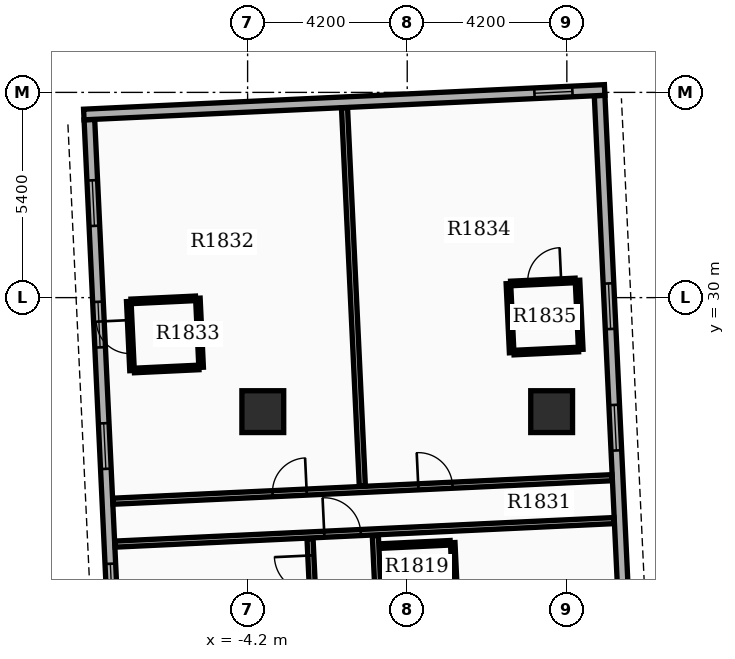
"""IFC4 building model, lengths in metres.
Left out: names, types, materials, properties, quantities, classifications, styles, units other than length and angle.
Written with IfcOpenShell. Run it as: python <this file> out.ifc"""

import sys

from ifc_helpers import new_model, si_unit, direction, frame, frame_2d, origin, origin_2d, place, context, subcontext, project, spatial, rectangle, extrude, element, fill, save


model = new_model("IFC4")
c1 = context("Model", 3, precision=1e-05, world=origin(), true_north=direction((0.0, 1.0)))
c2 = subcontext(c1, "Body", "Model", "MODEL_VIEW")
j1 = project(units=[si_unit("LENGTHUNIT", "METRE"), si_unit("PLANEANGLEUNIT", "RADIAN")], contexts=[c1])
p1 = place(None, origin())
s1 = spatial("IfcSite", under=j1, at=p1, CompositionType="ELEMENT")
p2 = place(p1, origin())
s2 = spatial("IfcBuilding", under=s1, at=p2, CompositionType="ELEMENT")
p3 = place(p2, frame((0.0, 0.0, 116.4)))
s3 = spatial("IfcBuildingStorey", under=s2, at=p3, CompositionType="ELEMENT", Elevation=116.4)
for number, where, z_axis, x_axis in (
    (1, (-3.8, 27.0, 0.0), (0.0, 0.0, 1.0), (1.0, 0.0, 0.0)),
    (2, (3.8, 27.0, 0.0), (0.0, 0.0, 1.0), (1.0, 0.0, 0.0)),
):
    element("IfcColumn", number, at=place(p3, frame(where, z_axis=z_axis, x_axis=x_axis)), inside=s3, PredefinedType="COLUMN", context=c2, shape_type="SweptSolid", body=[
        extrude(rectangle(XDim=1.1, YDim=1.1, at=origin_2d()), origin(), (0.0, 0.0, 1.0), 3.9),
    ])
p4 = place(p3, frame((6.009, 15.24, 0.0), z_axis=(0.0, 0.0, 1.0), x_axis=(-0.047103473814, 0.998890015344, 0.0)))
e3 = element("IfcWall", 3, at=p4, inside=s3, PredefinedType="STANDARD", context=c2, shape_type="SweptSolid", body=[
    extrude(rectangle(XDim=20.1, YDim=0.28, at=frame_2d((10.05, 0.0))), origin(), (0.0, 0.0, 1.0), 2.97),
])
p5 = place(p4, frame((1.6, 0.0, 0.8)))
e4 = element("IfcOpeningElement", 4, at=p5, cuts=e3, PredefinedType="OPENING", context=c2, shape_type="SweptSolid", body=[
    extrude(rectangle(XDim=1.2, YDim=1.6, at=frame_2d((0.6, 0.8))), frame((0.0, 0.15, 0.0), z_axis=(0.0, -1.0, 0.0), x_axis=(1.0, 0.0, 0.0)), (0.0, 0.0, 1.0), 0.3),
])
p6 = place(p4, frame((4.8, 0.0, 0.8)))
e5 = element("IfcOpeningElement", 5, at=p6, cuts=e3, PredefinedType="OPENING", context=c2, shape_type="SweptSolid", body=[
    extrude(rectangle(XDim=1.2, YDim=1.6, at=frame_2d((0.6, 0.8))), frame((0.0, 0.15, 0.0), z_axis=(0.0, -1.0, 0.0), x_axis=(1.0, 0.0, 0.0)), (0.0, 0.0, 1.0), 0.3),
])
p7 = place(p4, frame((10.75, 0.0, 0.8)))
e6 = element("IfcOpeningElement", 6, at=p7, cuts=e3, PredefinedType="OPENING", context=c2, shape_type="SweptSolid", body=[
    extrude(rectangle(XDim=1.2, YDim=1.6, at=frame_2d((0.6, 0.8))), frame((0.0, 0.15, 0.0), z_axis=(0.0, -1.0, 0.0), x_axis=(1.0, 0.0, 0.0)), (0.0, 0.0, 1.0), 0.3),
])
p8 = place(p4, frame((13.95, 0.0, 0.8)))
e7 = element("IfcOpeningElement", 7, at=p8, cuts=e3, PredefinedType="OPENING", context=c2, shape_type="SweptSolid", body=[
    extrude(rectangle(XDim=1.2, YDim=1.6, at=frame_2d((0.6, 0.8))), frame((0.0, 0.15, 0.0), z_axis=(0.0, -1.0, 0.0), x_axis=(1.0, 0.0, 0.0)), (0.0, 0.0, 1.0), 0.3),
])
p9 = place(p3, frame((-8.363, 34.685, 0.0), z_axis=(0.0, 0.0, 1.0), x_axis=(0.047103473814, -0.998890015344, 0.0)))
e8 = element("IfcWall", 8, at=p9, inside=s3, PredefinedType="STANDARD", context=c2, shape_type="SweptSolid", body=[
    extrude(rectangle(XDim=20.1, YDim=0.28, at=frame_2d((10.05, 0.0))), origin(), (0.0, 0.0, 1.0), 2.97),
])
p10 = place(p9, frame((1.6, 0.0, 0.8)))
e9 = element("IfcOpeningElement", 9, at=p10, cuts=e8, PredefinedType="OPENING", context=c2, shape_type="SweptSolid", body=[
    extrude(rectangle(XDim=1.2, YDim=1.6, at=frame_2d((0.6, 0.8))), frame((0.0, 0.15, 0.0), z_axis=(0.0, -1.0, 0.0), x_axis=(1.0, 0.0, 0.0)), (0.0, 0.0, 1.0), 0.3),
])
p11 = place(p9, frame((4.8, 0.0, 0.8)))
e10 = element("IfcOpeningElement", 10, at=p11, cuts=e8, PredefinedType="OPENING", context=c2, shape_type="SweptSolid", body=[
    extrude(rectangle(XDim=1.2, YDim=1.6, at=frame_2d((0.6, 0.8))), frame((0.0, 0.15, 0.0), z_axis=(0.0, -1.0, 0.0), x_axis=(1.0, 0.0, 0.0)), (0.0, 0.0, 1.0), 0.3),
])
p12 = place(p9, frame((8.0, 0.0, 0.8)))
e11 = element("IfcOpeningElement", 11, at=p12, cuts=e8, PredefinedType="OPENING", context=c2, shape_type="SweptSolid", body=[
    extrude(rectangle(XDim=1.2, YDim=1.6, at=frame_2d((0.6, 0.8))), frame((0.0, 0.15, 0.0), z_axis=(0.0, -1.0, 0.0), x_axis=(1.0, 0.0, 0.0)), (0.0, 0.0, 1.0), 0.3),
])
p13 = place(p9, frame((11.7, 0.0, 0.8)))
e12 = element("IfcOpeningElement", 12, at=p13, cuts=e8, PredefinedType="OPENING", context=c2, shape_type="SweptSolid", body=[
    extrude(rectangle(XDim=1.2, YDim=1.6, at=frame_2d((0.6, 0.8))), frame((0.0, 0.15, 0.0), z_axis=(0.0, -1.0, 0.0), x_axis=(1.0, 0.0, 0.0)), (0.0, 0.0, 1.0), 0.3),
])
p14 = place(p3, frame((5.195, 35.464, 0.0), z_axis=(0.0, 0.0, 1.0), x_axis=(-0.998890092147, -0.047101845086, 0.0)))
e13 = element("IfcWall", 13, at=p14, inside=s3, PredefinedType="STANDARD", context=c2, shape_type="SweptSolid", body=[
    extrude(rectangle(XDim=13.72, YDim=0.28, at=frame_2d((6.86, 0.0))), origin(), (0.0, 0.0, 1.0), 2.97),
])
p15 = place(p14, frame((0.85, 0.0, 0.85)))
e14 = element("IfcOpeningElement", 14, at=p15, cuts=e13, PredefinedType="OPENING", context=c2, shape_type="SweptSolid", body=[
    extrude(rectangle(XDim=1.0, YDim=1.5, at=frame_2d((0.5, 0.75))), frame((0.0, 0.15, 0.0), z_axis=(0.0, -1.0, 0.0), x_axis=(1.0, 0.0, 0.0)), (0.0, 0.0, 1.0), 0.3),
])
p16 = place(p3, frame((-0.42, 14.847, 0.0), z_axis=(0.0, 0.0, 1.0), x_axis=(-0.047099864025, 0.99889018556, 0.0)))
e15 = element("IfcWall", 15, at=p16, inside=s3, PredefinedType="PARTITIONING", context=c2, shape_type="SweptSolid", body=[
    extrude(rectangle(XDim=8.9, YDim=0.16, at=frame_2d((4.45, 0.0))), origin(), (0.0, 0.0, 1.0), 2.96),
])
p17 = place(p16, frame((0.953, 0.0, 0.0)))
e16 = element("IfcOpeningElement", 16, at=p17, cuts=e15, PredefinedType="OPENING", context=c2, shape_type="SweptSolid", body=[
    extrude(rectangle(XDim=0.96, YDim=2.15, at=frame_2d((0.48, 1.075))), frame((0.0, 0.09, 0.0), z_axis=(0.0, -1.0, 0.0), x_axis=(1.0, 0.0, 0.0)), (0.0, 0.0, 1.0), 0.18),
])
p18 = place(p3, frame((-0.686, 23.464, 0.0), z_axis=(0.0, 0.0, 1.0), x_axis=(0.998884467853, 0.047220968666, 0.0)))
e17 = element("IfcWall", 17, at=p18, inside=s3, PredefinedType="PARTITIONING", context=c2, shape_type="SweptSolid", body=[
    extrude(rectangle(XDim=1.82, YDim=0.12, at=frame_2d((0.91, 0.0))), origin(), (0.0, 0.0, 1.0), 2.96),
])
p19 = place(p3, frame((1.285, 21.675, 0.0), z_axis=(0.0, 0.0, 1.0), x_axis=(-0.04700985207, 0.998894425757, 0.0)))
e18 = element("IfcWall", 18, at=p19, inside=s3, PredefinedType="PARTITIONING", context=c2, shape_type="SweptSolid", body=[
    extrude(rectangle(XDim=1.88, YDim=0.12, at=frame_2d((0.94, 0.0))), origin(), (0.0, 0.0, 1.0), 2.96),
])
p20 = place(p3, frame((-2.138, 14.766, 0.0), z_axis=(0.0, 0.0, 1.0), x_axis=(-0.047099864025, 0.99889018556, 0.0)))
e19 = element("IfcWall", 19, at=p20, inside=s3, PredefinedType="PARTITIONING", context=c2, shape_type="SweptSolid", body=[
    extrude(rectangle(XDim=8.9, YDim=0.16, at=frame_2d((4.45, 0.0))), origin(), (0.0, 0.0, 1.0), 2.96),
])
p21 = place(p20, frame((7.5, 0.0, 0.0)))
e20 = element("IfcOpeningElement", 20, at=p21, cuts=e19, PredefinedType="OPENING", context=c2, shape_type="SweptSolid", body=[
    extrude(rectangle(XDim=0.96, YDim=2.15, at=frame_2d((0.48, 1.075))), frame((0.0, 0.09, 0.0), z_axis=(0.0, -1.0, 0.0), x_axis=(1.0, 0.0, 0.0)), (0.0, 0.0, 1.0), 0.18),
])
p22 = place(p3, frame((-7.688, 23.514, 0.0), z_axis=(0.0, 0.0, 1.0), x_axis=(0.998889093558, 0.047123017412, 0.0)))
e21 = element("IfcWall", 21, at=p22, inside=s3, PredefinedType="PARTITIONING", context=c2, shape_type="SweptSolid", body=[
    extrude(rectangle(XDim=13.144, YDim=0.16, at=frame_2d((6.572, 0.0))), origin(), (0.0, 0.0, 1.0), 2.96),
])
p23 = place(p22, frame((5.512, 0.0, 0.0)))
e22 = element("IfcOpeningElement", 22, at=p23, cuts=e21, PredefinedType="OPENING", context=c2, shape_type="SweptSolid", body=[
    extrude(rectangle(XDim=0.96, YDim=2.15, at=frame_2d((0.48, 1.075))), frame((0.0, 0.09, 0.0), z_axis=(0.0, -1.0, 0.0), x_axis=(1.0, 0.0, 0.0)), (0.0, 0.0, 1.0), 0.18),
])
p24 = place(p3, frame((-7.741, 24.643, 0.0), z_axis=(0.0, 0.0, 1.0), x_axis=(0.998889093558, 0.047123017412, 0.0)))
e23 = element("IfcWall", 23, at=p24, inside=s3, PredefinedType="PARTITIONING", context=c2, shape_type="SweptSolid", body=[
    extrude(rectangle(XDim=13.144, YDim=0.16, at=frame_2d((6.572, 0.0))), origin(), (0.0, 0.0, 1.0), 2.96),
])
p25 = place(p24, frame((4.202, 0.0, 0.0)))
e24 = element("IfcOpeningElement", 24, at=p25, cuts=e23, PredefinedType="OPENING", context=c2, shape_type="SweptSolid", body=[
    extrude(rectangle(XDim=0.9, YDim=2.15, at=frame_2d((0.45, 1.075))), frame((0.0, 0.09, 0.0), z_axis=(0.0, -1.0, 0.0), x_axis=(1.0, 0.0, 0.0)), (0.0, 0.0, 1.0), 0.18),
])
p26 = place(p24, frame((8.042, 0.0, 0.0)))
e25 = element("IfcOpeningElement", 25, at=p26, cuts=e23, PredefinedType="OPENING", context=c2, shape_type="SweptSolid", body=[
    extrude(rectangle(XDim=0.9, YDim=2.15, at=frame_2d((0.45, 1.075))), frame((0.0, 0.09, 0.0), z_axis=(0.0, -1.0, 0.0), x_axis=(1.0, 0.0, 0.0)), (0.0, 0.0, 1.0), 0.18),
])
p27 = place(p3, frame((-1.181, 25.042, 0.0), z_axis=(0.0, 0.0, 1.0), x_axis=(-0.047102889239, 0.99889004291, 0.0)))
e26 = element("IfcWall", 26, at=p27, inside=s3, PredefinedType="PARTITIONING", context=c2, shape_type="SweptSolid", body=[
    extrude(rectangle(XDim=9.962, YDim=0.16, at=frame_2d((4.981, 0.0))), origin(), (0.0, 0.0, 1.0), 2.96),
])
p28 = place(p3, frame((-7.241, 28.08, 0.0), z_axis=(0.0, 0.0, 1.0), x_axis=(-0.047080807099, 0.998891083954, 0.0)))
e27 = element("IfcWall", 27, at=p28, inside=s3, PredefinedType="PARTITIONING", context=c2, shape_type="SweptSolid", body=[
    extrude(rectangle(XDim=1.82, YDim=0.12, at=frame_2d((0.91, 0.0))), origin(), (0.0, 0.0, 1.0), 2.96),
])
p29 = place(p28, frame((0.45, 0.0, 0.0)))
e28 = element("IfcOpeningElement", 28, at=p29, cuts=e27, PredefinedType="OPENING", context=c2, shape_type="SweptSolid", body=[
    extrude(rectangle(XDim=0.88, YDim=2.1, at=frame_2d((0.44, 1.05))), frame((0.0, 0.07, 0.0), z_axis=(0.0, -1.0, 0.0), x_axis=(1.0, 0.0, 0.0)), (0.0, 0.0, 1.0), 0.14),
])
p30 = place(p3, frame((-5.423, 28.166, 0.0), z_axis=(0.0, 0.0, 1.0), x_axis=(-0.047080807099, 0.998891083954, 0.0)))
e29 = element("IfcWall", 29, at=p30, inside=s3, PredefinedType="PARTITIONING", context=c2, shape_type="SweptSolid", body=[
    extrude(rectangle(XDim=1.82, YDim=0.12, at=frame_2d((0.91, 0.0))), origin(), (0.0, 0.0, 1.0), 2.96),
])
p31 = place(p3, frame((-7.181, 28.083, 0.0), z_axis=(0.0, 0.0, 1.0), x_axis=(0.998890122477, 0.047101201865, 0.0)))
e30 = element("IfcWall", 30, at=p31, inside=s3, PredefinedType="PARTITIONING", context=c2, shape_type="SweptSolid", body=[
    extrude(rectangle(XDim=1.7, YDim=0.12, at=frame_2d((0.85, 0.0))), origin(), (0.0, 0.0, 1.0), 2.96),
])
p32 = place(p3, frame((-7.267, 29.901, 0.0), z_axis=(0.0, 0.0, 1.0), x_axis=(0.998889803826, 0.047107959116, 0.0)))
e31 = element("IfcWall", 31, at=p32, inside=s3, PredefinedType="PARTITIONING", context=c2, shape_type="SweptSolid", body=[
    extrude(rectangle(XDim=1.7, YDim=0.12, at=frame_2d((0.85, 0.0))), origin(), (0.0, 0.0, 1.0), 2.96),
])
p33 = place(p3, frame((2.748, 28.551, 0.0), z_axis=(0.0, 0.0, 1.0), x_axis=(-0.047080807099, 0.998891083954, 0.0)))
e32 = element("IfcWall", 32, at=p33, inside=s3, PredefinedType="PARTITIONING", context=c2, shape_type="SweptSolid", body=[
    extrude(rectangle(XDim=1.82, YDim=0.12, at=frame_2d((0.91, 0.0))), origin(), (0.0, 0.0, 1.0), 2.96),
])
p34 = place(p3, frame((4.566, 28.637, 0.0), z_axis=(0.0, 0.0, 1.0), x_axis=(-0.047087116047, 0.998890786574, 0.0)))
e33 = element("IfcWall", 33, at=p34, inside=s3, PredefinedType="PARTITIONING", context=c2, shape_type="SweptSolid", body=[
    extrude(rectangle(XDim=1.82, YDim=0.12, at=frame_2d((0.91, 0.0))), origin(), (0.0, 0.0, 1.0), 2.96),
])
p35 = place(p3, frame((2.808, 28.554, 0.0), z_axis=(0.0, 0.0, 1.0), x_axis=(0.998889803826, 0.047107959116, 0.0)))
e34 = element("IfcWall", 34, at=p35, inside=s3, PredefinedType="PARTITIONING", context=c2, shape_type="SweptSolid", body=[
    extrude(rectangle(XDim=1.7, YDim=0.12, at=frame_2d((0.85, 0.0))), origin(), (0.0, 0.0, 1.0), 2.96),
])
p36 = place(p3, frame((2.722, 30.372, 0.0), z_axis=(0.0, 0.0, 1.0), x_axis=(0.998896551812, 0.046964654557, 0.0)))
e35 = element("IfcWall", 35, at=p36, inside=s3, PredefinedType="PARTITIONING", context=c2, shape_type="SweptSolid", body=[
    extrude(rectangle(XDim=1.7, YDim=0.12, at=frame_2d((0.85, 0.0))), origin(), (0.0, 0.0, 1.0), 2.96),
])
p37 = place(p36, frame((0.45, 0.0, 0.0)))
e36 = element("IfcOpeningElement", 36, at=p37, cuts=e35, PredefinedType="OPENING", context=c2, shape_type="SweptSolid", body=[
    extrude(rectangle(XDim=0.88, YDim=2.1, at=frame_2d((0.44, 1.05))), frame((0.0, 0.07, 0.0), z_axis=(0.0, -1.0, 0.0), x_axis=(1.0, 0.0, 0.0)), (0.0, 0.0, 1.0), 0.14),
])
p38 = place(p7, origin())
e37 = element("IfcWindow", 37, at=p38, inside=s3, PartitioningType="SINGLE_PANEL", PredefinedType="WINDOW", context=c2, shape_type="SweptSolid", body=[
    extrude(rectangle(XDim=1.2, YDim=1.6, at=frame_2d((0.6, 0.8))), frame((0.0, 0.03, 0.0), z_axis=(0.0, -1.0, 0.0), x_axis=(1.0, 0.0, 0.0)), (0.0, 0.0, 1.0), 0.06),
])
fill(e6, e37)
p39 = place(p8, origin())
e38 = element("IfcWindow", 38, at=p39, inside=s3, PartitioningType="SINGLE_PANEL", PredefinedType="WINDOW", context=c2, shape_type="SweptSolid", body=[
    extrude(rectangle(XDim=1.2, YDim=1.6, at=frame_2d((0.6, 0.8))), frame((0.0, 0.03, 0.0), z_axis=(0.0, -1.0, 0.0), x_axis=(1.0, 0.0, 0.0)), (0.0, 0.0, 1.0), 0.06),
])
fill(e7, e38)
p40 = place(p10, origin())
e39 = element("IfcWindow", 39, at=p40, inside=s3, PartitioningType="SINGLE_PANEL", PredefinedType="WINDOW", context=c2, shape_type="SweptSolid", body=[
    extrude(rectangle(XDim=1.2, YDim=1.6, at=frame_2d((0.6, 0.8))), frame((0.0, 0.03, 0.0), z_axis=(0.0, -1.0, 0.0), x_axis=(1.0, 0.0, 0.0)), (0.0, 0.0, 1.0), 0.06),
])
fill(e9, e39)
p41 = place(p11, origin())
e40 = element("IfcWindow", 40, at=p41, inside=s3, PartitioningType="SINGLE_PANEL", PredefinedType="WINDOW", context=c2, shape_type="SweptSolid", body=[
    extrude(rectangle(XDim=1.2, YDim=1.6, at=frame_2d((0.6, 0.8))), frame((0.0, 0.03, 0.0), z_axis=(0.0, -1.0, 0.0), x_axis=(1.0, 0.0, 0.0)), (0.0, 0.0, 1.0), 0.06),
])
fill(e10, e40)
p42 = place(p12, origin())
e41 = element("IfcWindow", 41, at=p42, inside=s3, PartitioningType="SINGLE_PANEL", PredefinedType="WINDOW", context=c2, shape_type="SweptSolid", body=[
    extrude(rectangle(XDim=1.2, YDim=1.6, at=frame_2d((0.6, 0.8))), frame((0.0, 0.03, 0.0), z_axis=(0.0, -1.0, 0.0), x_axis=(1.0, 0.0, 0.0)), (0.0, 0.0, 1.0), 0.06),
])
fill(e11, e41)
p43 = place(p13, origin())
e42 = element("IfcWindow", 42, at=p43, inside=s3, PartitioningType="SINGLE_PANEL", PredefinedType="WINDOW", context=c2, shape_type="SweptSolid", body=[
    extrude(rectangle(XDim=1.2, YDim=1.6, at=frame_2d((0.6, 0.8))), frame((0.0, 0.03, 0.0), z_axis=(0.0, -1.0, 0.0), x_axis=(1.0, 0.0, 0.0)), (0.0, 0.0, 1.0), 0.06),
])
fill(e12, e42)
p44 = place(p15, origin())
e43 = element("IfcWindow", 43, at=p44, inside=s3, PartitioningType="SINGLE_PANEL", PredefinedType="WINDOW", context=c2, shape_type="SweptSolid", body=[
    extrude(rectangle(XDim=1.0, YDim=1.5, at=frame_2d((0.5, 0.75))), frame((0.0, 0.03, 0.0), z_axis=(0.0, -1.0, 0.0), x_axis=(1.0, 0.0, 0.0)), (0.0, 0.0, 1.0), 0.06),
])
fill(e14, e43)
p45 = place(p21, origin())
e44 = element("IfcDoor", 44, at=p45, inside=s3, OperationType="SINGLE_SWING_RIGHT", PredefinedType="DOOR", context=c2, shape_type="SweptSolid", body=[
    extrude(rectangle(XDim=0.96, YDim=2.15, at=frame_2d((0.48, 1.075))), frame((0.0, 0.025, 0.0), z_axis=(0.0, -1.0, 0.0), x_axis=(1.0, 0.0, 0.0)), (0.0, 0.0, 1.0), 0.05),
])
fill(e20, e44)
p46 = place(p23, origin())
e45 = element("IfcDoor", 45, at=p46, inside=s3, OperationType="SINGLE_SWING_LEFT", PredefinedType="DOOR", context=c2, shape_type="SweptSolid", body=[
    extrude(rectangle(XDim=0.96, YDim=2.15, at=frame_2d((0.48, 1.075))), frame((0.0, 0.025, 0.0), z_axis=(0.0, -1.0, 0.0), x_axis=(1.0, 0.0, 0.0)), (0.0, 0.0, 1.0), 0.05),
])
fill(e22, e45)
p47 = place(p25, origin())
e46 = element("IfcDoor", 46, at=p47, inside=s3, OperationType="SINGLE_SWING_RIGHT", PredefinedType="DOOR", context=c2, shape_type="SweptSolid", body=[
    extrude(rectangle(XDim=0.9, YDim=2.15, at=frame_2d((0.45, 1.075))), frame((0.0, 0.025, 0.0), z_axis=(0.0, -1.0, 0.0), x_axis=(1.0, 0.0, 0.0)), (0.0, 0.0, 1.0), 0.05),
])
fill(e24, e46)
p48 = place(p29, origin())
e47 = element("IfcDoor", 47, at=p48, inside=s3, OperationType="SINGLE_SWING_RIGHT", PredefinedType="DOOR", context=c2, shape_type="SweptSolid", body=[
    extrude(rectangle(XDim=0.88, YDim=2.1, at=frame_2d((0.44, 1.05))), frame((0.0, 0.025, 0.0), z_axis=(0.0, -1.0, 0.0), x_axis=(1.0, 0.0, 0.0)), (0.0, 0.0, 1.0), 0.05),
])
fill(e28, e47)
p49 = place(p26, origin())
e48 = element("IfcDoor", 48, at=p49, inside=s3, OperationType="SINGLE_SWING_LEFT", PredefinedType="DOOR", context=c2, shape_type="SweptSolid", body=[
    extrude(rectangle(XDim=0.9, YDim=2.15, at=frame_2d((0.45, 1.075))), frame((0.0, 0.025, 0.0), z_axis=(0.0, -1.0, 0.0), x_axis=(1.0, 0.0, 0.0)), (0.0, 0.0, 1.0), 0.05),
])
fill(e25, e48)
p50 = place(p37, origin())
e49 = element("IfcDoor", 49, at=p50, inside=s3, OperationType="SINGLE_SWING_RIGHT", PredefinedType="DOOR", context=c2, shape_type="SweptSolid", body=[
    extrude(rectangle(XDim=0.88, YDim=2.1, at=frame_2d((0.44, 1.05))), frame((0.0, 0.025, 0.0), z_axis=(0.0, -1.0, 0.0), x_axis=(1.0, 0.0, 0.0)), (0.0, 0.0, 1.0), 0.05),
])
fill(e36, e49)
save(model, sys.argv[1])
